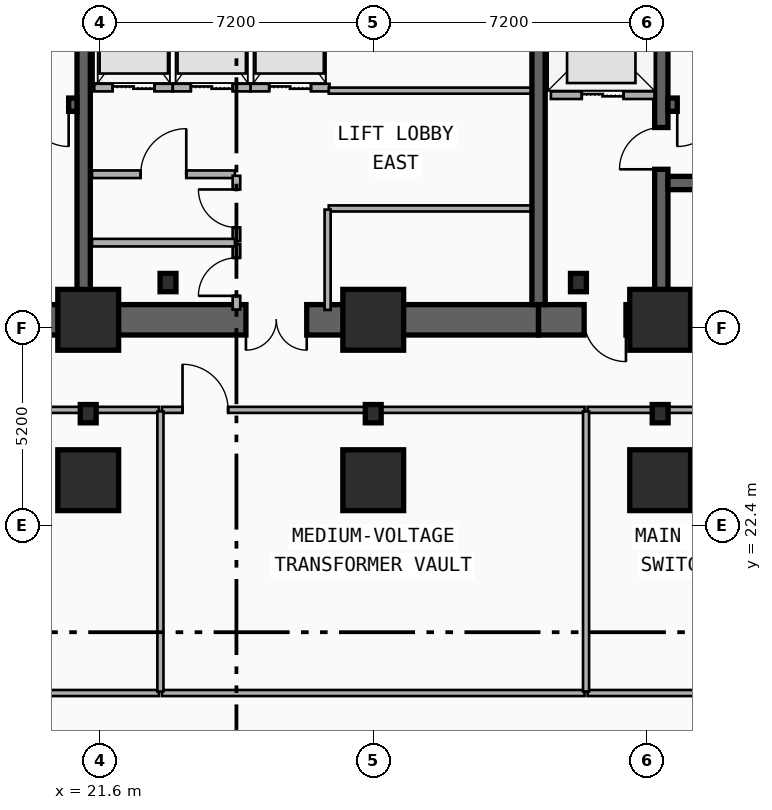
"""IFC4 building model, lengths in metres.
Left out: names, types, materials, properties, quantities, classifications, styles, units other than length and angle.
Written with IfcOpenShell. Run it as: python <this file> out.ifc"""

import sys

from ifc_helpers import new_model, si_unit, direction, frame, frame_2d, origin, origin_2d, place, context, subcontext, project, spatial, rectangle, i_section, extrude, element, fill, save


model = new_model("IFC4")
c1 = context("Model", 3, precision=1e-05, world=origin(), true_north=direction((0.0, 1.0)))
c2 = subcontext(c1, "Body", "Model", "MODEL_VIEW")
j1 = project(units=[si_unit("LENGTHUNIT", "METRE"), si_unit("PLANEANGLEUNIT", "RADIAN")], contexts=[c1])
p1 = place(None, origin())
s1 = spatial("IfcSite", under=j1, at=p1, CompositionType="ELEMENT")
p2 = place(p1, origin())
s2 = spatial("IfcBuilding", under=s1, at=p2, CompositionType="ELEMENT")
p3 = place(p2, frame((0.0, 0.0, -8.8)))
s3 = spatial("IfcBuildingStorey", under=s2, at=p3, CompositionType="ELEMENT", Elevation=-8.8)
p4 = place(p3, frame((21.18, 27.82, 0.0), z_axis=(0.0, 0.0, 1.0), x_axis=(-1.0, 0.0, 0.0)))
e1 = element("IfcWall", 1, at=p4, inside=s3, PredefinedType="SHEAR", context=c2, shape_type="SweptSolid", body=[
    extrude(rectangle(XDim=9.03, YDim=0.8, at=frame_2d((4.515, 0.0))), origin(), (0.0, 0.0, 1.0), 4.4),
])
p5 = place(p4, frame((2.68, 0.0, 0.0)))
e2 = element("IfcOpeningElement", 2, at=p5, cuts=e1, PredefinedType="OPENING", context=c2, shape_type="SweptSolid", body=[
    extrude(rectangle(XDim=1.1, YDim=2.15, at=frame_2d((0.55, 1.075))), frame((0.0, 0.41, 0.0), z_axis=(0.0, -1.0, 0.0), x_axis=(1.0, 0.0, 0.0)), (0.0, 0.0, 1.0), 0.82),
])
p6 = place(p3, frame((33.15, 27.82, 0.0), z_axis=(0.0, 0.0, 1.0), x_axis=(-1.0, 0.0, 0.0)))
e3 = element("IfcWall", 3, at=p6, inside=s3, PredefinedType="SHEAR", context=c2, shape_type="SweptSolid", body=[
    extrude(rectangle(XDim=11.97, YDim=0.8, at=frame_2d((5.985, 0.0))), origin(), (0.0, 0.0, 1.0), 4.4),
])
p7 = place(p6, frame((6.1, 0.0, 0.0)))
e4 = element("IfcOpeningElement", 4, at=p7, cuts=e3, PredefinedType="OPENING", context=c2, shape_type="SweptSolid", body=[
    extrude(rectangle(XDim=1.6, YDim=2.2, at=frame_2d((0.8, 1.1))), frame((0.0, 0.41, 0.0), z_axis=(0.0, -1.0, 0.0), x_axis=(1.0, 0.0, 0.0)), (0.0, 0.0, 1.0), 0.82),
])
p8 = place(p3, frame((45.38, 27.82, 0.0), z_axis=(0.0, 0.0, 1.0), x_axis=(-1.0, 0.0, 0.0)))
e5 = element("IfcWall", 5, at=p8, inside=s3, PredefinedType="SHEAR", context=c2, shape_type="SweptSolid", body=[
    extrude(rectangle(XDim=12.23, YDim=0.8, at=frame_2d((6.115, 0.0))), origin(), (0.0, 0.0, 1.0), 4.4),
])
p9 = place(p8, frame((9.93, 0.0, 0.0)))
e6 = element("IfcOpeningElement", 6, at=p9, cuts=e5, PredefinedType="OPENING", context=c2, shape_type="SweptSolid", body=[
    extrude(rectangle(XDim=1.1, YDim=2.15, at=frame_2d((0.55, 1.075))), frame((0.0, 0.41, 0.0), z_axis=(0.0, -1.0, 0.0), x_axis=(1.0, 0.0, 0.0)), (0.0, 0.0, 1.0), 0.82),
])
p10 = place(p8, frame((6.23, 0.0, 0.0)))
e7 = element("IfcOpeningElement", 7, at=p10, cuts=e5, PredefinedType="OPENING", context=c2, shape_type="SweptSolid", body=[
    extrude(rectangle(XDim=1.1, YDim=2.15, at=frame_2d((0.55, 1.075))), frame((0.0, 0.41, 0.0), z_axis=(0.0, -1.0, 0.0), x_axis=(1.0, 0.0, 0.0)), (0.0, 0.0, 1.0), 0.82),
])
for number, where, z_axis, x_axis in (
    (8, (21.18, 28.22, 0.0), (0.0, 0.0, 1.0), (0.0, 1.0, 0.0)),
    (9, (33.15, 28.22, 0.0), (0.0, 0.0, 1.0), (0.0, 1.0, 0.0)),
):
    element("IfcWall", number, at=place(p3, frame(where, z_axis=z_axis, x_axis=x_axis)), inside=s3, PredefinedType="SHEAR", context=c2, shape_type="SweptSolid", body=[
        extrude(rectangle(XDim=8.43, YDim=0.35, at=frame_2d((4.215, 0.0))), origin(), (0.0, 0.0, 1.0), 4.4),
    ])
p11 = place(p3, frame((36.38, 28.22, 0.0), z_axis=(0.0, 0.0, 1.0), x_axis=(0.0, 1.0, 0.0)))
e10 = element("IfcWall", 10, at=p11, inside=s3, PredefinedType="SHEAR", context=c2, shape_type="SweptSolid", body=[
    extrude(rectangle(XDim=8.43, YDim=0.35, at=frame_2d((4.215, 0.0))), origin(), (0.0, 0.0, 1.0), 4.4),
])
p12 = place(p11, frame((3.56, 0.0, 0.0)))
e11 = element("IfcOpeningElement", 11, at=p12, cuts=e10, PredefinedType="OPENING", context=c2, shape_type="SweptSolid", body=[
    extrude(rectangle(XDim=1.1, YDim=2.15, at=frame_2d((0.55, 1.075))), frame((0.0, 0.185, 0.0), z_axis=(0.0, -1.0, 0.0), x_axis=(1.0, 0.0, 0.0)), (0.0, 0.0, 1.0), 0.37),
])
p13 = place(p3, frame((21.005, 33.48, 0.0), z_axis=(0.0, 0.0, 1.0), x_axis=(-1.0, 0.0, 0.0)))
e12 = element("IfcWall", 12, at=p13, inside=s3, PredefinedType="SHEAR", context=c2, shape_type="SweptSolid", body=[
    extrude(rectangle(XDim=8.455, YDim=0.35, at=frame_2d((4.228, 0.0))), origin(), (0.0, 0.0, 1.0), 4.4),
])
p14 = place(p13, frame((0.22, 0.0, 0.0)))
e13 = element("IfcOpeningElement", 13, at=p14, cuts=e12, PredefinedType="OPENING", context=c2, shape_type="SweptSolid", body=[
    extrude(rectangle(XDim=1.1, YDim=2.15, at=frame_2d((0.55, 1.075))), frame((0.0, 0.185, 0.0), z_axis=(0.0, -1.0, 0.0), x_axis=(1.0, 0.0, 0.0)), (0.0, 0.0, 1.0), 0.37),
])
p15 = place(p3, frame((44.98, 33.48, 0.0), z_axis=(0.0, 0.0, 1.0), x_axis=(-1.0, 0.0, 0.0)))
e14 = element("IfcWall", 14, at=p15, inside=s3, PredefinedType="SHEAR", context=c2, shape_type="SweptSolid", body=[
    extrude(rectangle(XDim=8.425, YDim=0.35, at=frame_2d((4.212, 0.0))), origin(), (0.0, 0.0, 1.0), 4.4),
])
p16 = place(p15, frame((7.08, 0.0, 0.0)))
e15 = element("IfcOpeningElement", 15, at=p16, cuts=e14, PredefinedType="OPENING", context=c2, shape_type="SweptSolid", body=[
    extrude(rectangle(XDim=1.1, YDim=2.15, at=frame_2d((0.55, 1.075))), frame((0.0, 0.185, 0.0), z_axis=(0.0, -1.0, 0.0), x_axis=(1.0, 0.0, 0.0)), (0.0, 0.0, 1.0), 0.37),
])
p17 = place(p3, frame((36.555, 31.42, 0.0), z_axis=(0.0, 0.0, 1.0), x_axis=(1.0, 0.0, 0.0)))
e16 = element("IfcWall", 16, at=p17, inside=s3, PredefinedType="SHEAR", context=c2, shape_type="SweptSolid", body=[
    extrude(rectangle(XDim=8.425, YDim=0.35, at=frame_2d((4.212, 0.0))), origin(), (0.0, 0.0, 1.0), 4.4),
])
for number, where, z_axis, x_axis in (
    (17, (23.4, 28.8, 0.0), (0.0, 0.0, 1.0), (1.0, 0.0, 0.0)),
    (18, (34.2, 28.8, 0.0), (0.0, 0.0, 1.0), (1.0, 0.0, 0.0)),
):
    element("IfcColumn", number, at=place(p3, frame(where, z_axis=z_axis, x_axis=x_axis)), inside=s3, PredefinedType="COLUMN", context=c2, shape_type="SweptSolid", body=[
        extrude(i_section(OverallWidth=0.418, OverallDepth=0.481, WebThickness=0.043, FlangeThickness=0.068, FilletRadius=0.015, at=origin_2d()), origin(), (0.0, 0.0, 1.0), 4.4),
    ])
for number, where, z_axis, x_axis in (
    (19, (21.3, 27.82, 0.0), (0.0, 0.0, 1.0), (1.0, 0.0, 0.0)),
    (20, (28.8, 27.82, 0.0), (0.0, 0.0, 1.0), (1.0, 0.0, 0.0)),
    (21, (36.35, 27.82, 0.0), (0.0, 0.0, 1.0), (1.0, 0.0, 0.0)),
):
    element("IfcColumn", number, at=place(p3, frame(where, z_axis=z_axis, x_axis=x_axis)), inside=s3, PredefinedType="COLUMN", context=c2, shape_type="SweptSolid", body=[
        extrude(rectangle(XDim=1.6, YDim=1.6, at=origin_2d()), origin(), (0.0, 0.0, 1.0), 4.4),
    ])
for number, where, z_axis, x_axis in (
    (22, (21.3, 25.35, 0.0), (0.0, 0.0, 1.0), (1.0, 0.0, 0.0)),
    (23, (28.8, 25.35, 0.0), (0.0, 0.0, 1.0), (1.0, 0.0, 0.0)),
    (24, (36.35, 25.35, 0.0), (0.0, 0.0, 1.0), (1.0, 0.0, 0.0)),
):
    element("IfcColumn", number, at=place(p3, frame(where, z_axis=z_axis, x_axis=x_axis)), inside=s3, PredefinedType="COLUMN", context=c2, shape_type="SweptSolid", body=[
        extrude(i_section(OverallWidth=0.418, OverallDepth=0.481, WebThickness=0.043, FlangeThickness=0.068, FilletRadius=0.015, at=origin_2d()), origin(), (0.0, 0.0, 1.0), 4.4),
    ])
for number, where, z_axis, x_axis in (
    (25, (21.3, 23.6, 0.0), (0.0, 0.0, 1.0), (1.0, 0.0, 0.0)),
    (26, (28.8, 23.6, 0.0), (0.0, 0.0, 1.0), (1.0, 0.0, 0.0)),
    (27, (36.35, 23.6, 0.0), (0.0, 0.0, 1.0), (1.0, 0.0, 0.0)),
):
    element("IfcColumn", number, at=place(p3, frame(where, z_axis=z_axis, x_axis=x_axis)), inside=s3, PredefinedType="COLUMN", context=c2, shape_type="SweptSolid", body=[
        extrude(rectangle(XDim=1.6, YDim=1.6, at=origin_2d()), origin(), (0.0, 0.0, 1.0), 4.4),
    ])
p18 = place(p3, frame((33.475, 33.73, 0.0), z_axis=(0.0, 0.0, 1.0), x_axis=(1.0, 0.0, 0.0)))
e28 = element("IfcWall", 28, at=p18, inside=s3, PredefinedType="PARTITIONING", context=c2, shape_type="SweptSolid", body=[
    extrude(rectangle(XDim=2.725, YDim=0.2, at=frame_2d((1.362, 0.0))), origin(), (0.0, 0.0, 1.0), 3.052),
])
p19 = place(p18, frame((0.812, 0.0, 0.0)))
e29 = element("IfcOpeningElement", 29, at=p19, cuts=e28, PredefinedType="OPENING", context=c2, shape_type="SweptSolid", body=[
    extrude(rectangle(XDim=1.1, YDim=2.15, at=frame_2d((0.55, 1.075))), frame((0.0, 0.11, 0.0), z_axis=(0.0, -1.0, 0.0), x_axis=(1.0, 0.0, 0.0)), (0.0, 0.0, 1.0), 0.22),
])
p20 = place(p3, frame((21.46, 33.93, 0.0), z_axis=(0.0, 0.0, 1.0), x_axis=(1.0, 0.0, 0.0)))
e30 = element("IfcWall", 30, at=p20, inside=s3, PredefinedType="PARTITIONING", context=c2, shape_type="SweptSolid", body=[
    extrude(rectangle(XDim=2.065, YDim=0.2, at=frame_2d((1.032, 0.0))), origin(), (0.0, 0.0, 1.0), 3.052),
])
p21 = place(p20, frame((0.482, 0.0, 0.0)))
e31 = element("IfcOpeningElement", 31, at=p21, cuts=e30, PredefinedType="OPENING", context=c2, shape_type="SweptSolid", body=[
    extrude(rectangle(XDim=1.1, YDim=2.15, at=frame_2d((0.55, 1.075))), frame((0.0, 0.11, 0.0), z_axis=(0.0, -1.0, 0.0), x_axis=(1.0, 0.0, 0.0)), (0.0, 0.0, 1.0), 0.22),
])
p22 = place(p3, frame((23.525, 33.93, 0.0), z_axis=(0.0, 0.0, 1.0), x_axis=(1.0, 0.0, 0.0)))
e32 = element("IfcWall", 32, at=p22, inside=s3, PredefinedType="PARTITIONING", context=c2, shape_type="SweptSolid", body=[
    extrude(rectangle(XDim=2.05, YDim=0.2, at=frame_2d((1.025, 0.0))), origin(), (0.0, 0.0, 1.0), 4.08),
])
p23 = place(p22, frame((0.475, 0.0, 0.0)))
e33 = element("IfcOpeningElement", 33, at=p23, cuts=e32, PredefinedType="OPENING", context=c2, shape_type="SweptSolid", body=[
    extrude(rectangle(XDim=1.1, YDim=2.15, at=frame_2d((0.55, 1.075))), frame((0.0, 0.11, 0.0), z_axis=(0.0, -1.0, 0.0), x_axis=(1.0, 0.0, 0.0)), (0.0, 0.0, 1.0), 0.22),
])
p24 = place(p3, frame((25.575, 33.93, 0.0), z_axis=(0.0, 0.0, 1.0), x_axis=(1.0, 0.0, 0.0)))
e34 = element("IfcWall", 34, at=p24, inside=s3, PredefinedType="PARTITIONING", context=c2, shape_type="SweptSolid", body=[
    extrude(rectangle(XDim=2.075, YDim=0.2, at=frame_2d((1.038, 0.0))), origin(), (0.0, 0.0, 1.0), 4.08),
])
p25 = place(p24, frame((0.488, 0.0, 0.0)))
e35 = element("IfcOpeningElement", 35, at=p25, cuts=e34, PredefinedType="OPENING", context=c2, shape_type="SweptSolid", body=[
    extrude(rectangle(XDim=1.1, YDim=2.15, at=frame_2d((0.55, 1.075))), frame((0.0, 0.11, 0.0), z_axis=(0.0, -1.0, 0.0), x_axis=(1.0, 0.0, 0.0)), (0.0, 0.0, 1.0), 0.22),
])
p26 = place(p3, frame((21.4, 31.65, 0.0), z_axis=(0.0, 0.0, 1.0), x_axis=(1.0, 0.0, 0.0)))
e36 = element("IfcWall", 36, at=p26, inside=s3, PredefinedType="PARTITIONING", context=c2, shape_type="SweptSolid", body=[
    extrude(rectangle(XDim=3.76, YDim=0.2, at=frame_2d((1.88, 0.0))), origin(), (0.0, 0.0, 1.0), 3.052),
])
p27 = place(p26, frame((1.28, 0.0, 0.0)))
e37 = element("IfcOpeningElement", 37, at=p27, cuts=e36, PredefinedType="OPENING", context=c2, shape_type="SweptSolid", body=[
    extrude(rectangle(XDim=1.2, YDim=2.15, at=frame_2d((0.6, 1.075))), frame((0.0, 0.11, 0.0), z_axis=(0.0, -1.0, 0.0), x_axis=(1.0, 0.0, 0.0)), (0.0, 0.0, 1.0), 0.22),
])
p28 = place(p3, frame((25.2, 28.09, 0.0), z_axis=(0.0, 0.0, 1.0), x_axis=(0.0, 1.0, 0.0)))
e38 = element("IfcWall", 38, at=p28, inside=s3, PredefinedType="PARTITIONING", context=c2, shape_type="SweptSolid", body=[
    extrude(rectangle(XDim=1.72, YDim=0.2, at=frame_2d((0.86, 0.0))), origin(), (0.0, 0.0, 1.0), 4.08),
])
p29 = place(p28, frame((0.36, 0.0, 0.0)))
e39 = element("IfcOpeningElement", 39, at=p29, cuts=e38, PredefinedType="OPENING", context=c2, shape_type="SweptSolid", body=[
    extrude(rectangle(XDim=1.0, YDim=2.15, at=frame_2d((0.5, 1.075))), frame((0.0, 0.11, 0.0), z_axis=(0.0, -1.0, 0.0), x_axis=(1.0, 0.0, 0.0)), (0.0, 0.0, 1.0), 0.22),
])
p30 = place(p3, frame((25.2, 29.89, 0.0), z_axis=(0.0, 0.0, 1.0), x_axis=(0.0, 1.0, 0.0)))
e40 = element("IfcWall", 40, at=p30, inside=s3, PredefinedType="PARTITIONING", context=c2, shape_type="SweptSolid", body=[
    extrude(rectangle(XDim=1.72, YDim=0.2, at=frame_2d((0.86, 0.0))), origin(), (0.0, 0.0, 1.0), 4.08),
])
p31 = place(p30, frame((0.36, 0.0, 0.0)))
e41 = element("IfcOpeningElement", 41, at=p31, cuts=e40, PredefinedType="OPENING", context=c2, shape_type="SweptSolid", body=[
    extrude(rectangle(XDim=1.0, YDim=2.15, at=frame_2d((0.5, 1.075))), frame((0.0, 0.11, 0.0), z_axis=(0.0, -1.0, 0.0), x_axis=(1.0, 0.0, 0.0)), (0.0, 0.0, 1.0), 0.22),
])
p32 = place(p3, frame((21.4, 29.85, 0.0), z_axis=(0.0, 0.0, 1.0), x_axis=(1.0, 0.0, 0.0)))
e42 = element("IfcWall", 42, at=p32, inside=s3, PredefinedType="PARTITIONING", context=c2, shape_type="SweptSolid", body=[
    extrude(rectangle(XDim=3.76, YDim=0.2, at=frame_2d((1.88, 0.0))), origin(), (0.0, 0.0, 1.0), 3.052),
])
p33 = place(p3, frame((12.04, 25.45, 0.0), z_axis=(0.0, 0.0, 1.0), x_axis=(1.0, 0.0, 0.0)))
e43 = element("IfcWall", 43, at=p33, inside=s3, PredefinedType="PARTITIONING", context=c2, shape_type="SweptSolid", body=[
    extrude(rectangle(XDim=11.12, YDim=0.16, at=frame_2d((5.56, 0.0))), origin(), (0.0, 0.0, 1.0), 3.246),
])
p34 = place(p33, frame((4.96, 0.0, 0.0)))
e44 = element("IfcOpeningElement", 44, at=p34, cuts=e43, PredefinedType="OPENING", context=c2, shape_type="SweptSolid", body=[
    extrude(rectangle(XDim=1.2, YDim=2.15, at=frame_2d((0.6, 1.075))), frame((0.0, 0.09, 0.0), z_axis=(0.0, -1.0, 0.0), x_axis=(1.0, 0.0, 0.0)), (0.0, 0.0, 1.0), 0.18),
])
p35 = place(p3, frame((23.24, 25.45, 0.0), z_axis=(0.0, 0.0, 1.0), x_axis=(1.0, 0.0, 0.0)))
e45 = element("IfcWall", 45, at=p35, inside=s3, PredefinedType="PARTITIONING", context=c2, shape_type="SweptSolid", body=[
    extrude(rectangle(XDim=11.12, YDim=0.16, at=frame_2d((5.56, 0.0))), origin(), (0.0, 0.0, 1.0), 4.08),
])
p36 = place(p35, frame((0.542, 0.0, 0.0)))
e46 = element("IfcOpeningElement", 46, at=p36, cuts=e45, PredefinedType="OPENING", context=c2, shape_type="SweptSolid", body=[
    extrude(rectangle(XDim=1.2, YDim=2.15, at=frame_2d((0.6, 1.075))), frame((0.0, 0.09, 0.0), z_axis=(0.0, -1.0, 0.0), x_axis=(1.0, 0.0, 0.0)), (0.0, 0.0, 1.0), 0.18),
])
p37 = place(p3, frame((34.44, 25.45, 0.0), z_axis=(0.0, 0.0, 1.0), x_axis=(1.0, 0.0, 0.0)))
e47 = element("IfcWall", 47, at=p37, inside=s3, PredefinedType="PARTITIONING", context=c2, shape_type="SweptSolid", body=[
    extrude(rectangle(XDim=11.12, YDim=0.16, at=frame_2d((5.56, 0.0))), origin(), (0.0, 0.0, 1.0), 3.246),
])
p38 = place(p37, frame((4.96, 0.0, 0.0)))
e48 = element("IfcOpeningElement", 48, at=p38, cuts=e47, PredefinedType="OPENING", context=c2, shape_type="SweptSolid", body=[
    extrude(rectangle(XDim=1.2, YDim=2.15, at=frame_2d((0.6, 1.075))), frame((0.0, 0.09, 0.0), z_axis=(0.0, -1.0, 0.0), x_axis=(1.0, 0.0, 0.0)), (0.0, 0.0, 1.0), 0.18),
])
p39 = place(p3, frame((12.04, 18.0, 0.0), z_axis=(0.0, 0.0, 1.0), x_axis=(1.0, 0.0, 0.0)))
e49 = element("IfcWall", 49, at=p39, inside=s3, PredefinedType="PARTITIONING", context=c2, shape_type="SweptSolid", body=[
    extrude(rectangle(XDim=11.12, YDim=0.16, at=frame_2d((5.56, 0.0))), origin(), (0.0, 0.0, 1.0), 3.246),
])
p40 = place(p3, frame((23.24, 18.0, 0.0), z_axis=(0.0, 0.0, 1.0), x_axis=(1.0, 0.0, 0.0)))
e50 = element("IfcWall", 50, at=p40, inside=s3, PredefinedType="PARTITIONING", context=c2, shape_type="SweptSolid", body=[
    extrude(rectangle(XDim=11.12, YDim=0.16, at=frame_2d((5.56, 0.0))), origin(), (0.0, 0.0, 1.0), 4.08),
])
p41 = place(p3, frame((34.44, 18.0, 0.0), z_axis=(0.0, 0.0, 1.0), x_axis=(1.0, 0.0, 0.0)))
e51 = element("IfcWall", 51, at=p41, inside=s3, PredefinedType="PARTITIONING", context=c2, shape_type="SweptSolid", body=[
    extrude(rectangle(XDim=11.12, YDim=0.16, at=frame_2d((5.56, 0.0))), origin(), (0.0, 0.0, 1.0), 3.246),
])
for number, where, z_axis, x_axis in (
    (52, (23.2, 18.04, 0.0), (0.0, 0.0, 1.0), (0.0, 1.0, 0.0)),
    (53, (34.4, 18.04, 0.0), (0.0, 0.0, 1.0), (0.0, 1.0, 0.0)),
):
    element("IfcWall", number, at=place(p3, frame(where, z_axis=z_axis, x_axis=x_axis)), inside=s3, PredefinedType="PARTITIONING", context=c2, shape_type="SweptSolid", body=[
        extrude(rectangle(XDim=7.37, YDim=0.16, at=frame_2d((3.685, 0.0))), origin(), (0.0, 0.0, 1.0), 2.66),
    ])
for number, where, z_axis, x_axis in (
    (54, (27.63, 30.75, 0.0), (0.0, 0.0, 1.0), (1.0, 0.0, 0.0)),
    (55, (27.63, 33.85, 0.0), (0.0, 0.0, 1.0), (1.0, 0.0, 0.0)),
):
    element("IfcWall", number, at=place(p3, frame(where, z_axis=z_axis, x_axis=x_axis)), inside=s3, PredefinedType="PARTITIONING", context=c2, shape_type="SweptSolid", body=[
        extrude(rectangle(XDim=5.31, YDim=0.16, at=frame_2d((2.655, 0.0))), origin(), (0.0, 0.0, 1.0), 3.052),
    ])
p42 = place(p3, frame((27.6, 28.08, 0.0), z_axis=(0.0, 0.0, 1.0), x_axis=(0.0, 1.0, 0.0)))
e56 = element("IfcWall", 56, at=p42, inside=s3, PredefinedType="PARTITIONING", context=c2, shape_type="SweptSolid", body=[
    extrude(rectangle(XDim=2.64, YDim=0.16, at=frame_2d((1.32, 0.0))), origin(), (0.0, 0.0, 1.0), 4.08),
])
p43 = place(p19, origin())
e57 = element("IfcDoor", 57, at=p43, inside=s3, OperationType="DOUBLE_DOOR_SLIDING", PredefinedType="DOOR", context=c2, shape_type="SweptSolid", body=[
    extrude(rectangle(XDim=1.1, YDim=2.15, at=frame_2d((0.55, 1.075))), frame((0.0, 0.025, 0.0), z_axis=(0.0, -1.0, 0.0), x_axis=(1.0, 0.0, 0.0)), (0.0, 0.0, 1.0), 0.05),
])
fill(e29, e57)
p44 = place(p21, origin())
e58 = element("IfcDoor", 58, at=p44, inside=s3, OperationType="DOUBLE_DOOR_SLIDING", PredefinedType="DOOR", context=c2, shape_type="SweptSolid", body=[
    extrude(rectangle(XDim=1.1, YDim=2.15, at=frame_2d((0.55, 1.075))), frame((0.0, 0.025, 0.0), z_axis=(0.0, -1.0, 0.0), x_axis=(1.0, 0.0, 0.0)), (0.0, 0.0, 1.0), 0.05),
])
fill(e31, e58)
p45 = place(p23, origin())
e59 = element("IfcDoor", 59, at=p45, inside=s3, OperationType="DOUBLE_DOOR_SLIDING", PredefinedType="DOOR", context=c2, shape_type="SweptSolid", body=[
    extrude(rectangle(XDim=1.1, YDim=2.15, at=frame_2d((0.55, 1.075))), frame((0.0, 0.025, 0.0), z_axis=(0.0, -1.0, 0.0), x_axis=(1.0, 0.0, 0.0)), (0.0, 0.0, 1.0), 0.05),
])
fill(e33, e59)
p46 = place(p25, origin())
e60 = element("IfcDoor", 60, at=p46, inside=s3, OperationType="DOUBLE_DOOR_SLIDING", PredefinedType="DOOR", context=c2, shape_type="SweptSolid", body=[
    extrude(rectangle(XDim=1.1, YDim=2.15, at=frame_2d((0.55, 1.075))), frame((0.0, 0.025, 0.0), z_axis=(0.0, -1.0, 0.0), x_axis=(1.0, 0.0, 0.0)), (0.0, 0.0, 1.0), 0.05),
])
fill(e35, e60)
p47 = place(p14, origin())
e61 = element("IfcDoor", 61, at=p47, inside=s3, OperationType="SINGLE_SWING_LEFT", PredefinedType="DOOR", context=c2, shape_type="SweptSolid", body=[
    extrude(rectangle(XDim=1.1, YDim=2.15, at=frame_2d((0.55, 1.075))), frame((0.0, 0.025, 0.0), z_axis=(0.0, -1.0, 0.0), x_axis=(1.0, 0.0, 0.0)), (0.0, 0.0, 1.0), 0.05),
])
fill(e13, e61)
p48 = place(p16, origin())
e62 = element("IfcDoor", 62, at=p48, inside=s3, OperationType="SINGLE_SWING_RIGHT", PredefinedType="DOOR", context=c2, shape_type="SweptSolid", body=[
    extrude(rectangle(XDim=1.1, YDim=2.15, at=frame_2d((0.55, 1.075))), frame((0.0, 0.025, 0.0), z_axis=(0.0, -1.0, 0.0), x_axis=(1.0, 0.0, 0.0)), (0.0, 0.0, 1.0), 0.05),
])
fill(e15, e62)
p49 = place(p12, origin())
e63 = element("IfcDoor", 63, at=p49, inside=s3, OperationType="SINGLE_SWING_LEFT", PredefinedType="DOOR", context=c2, shape_type="SweptSolid", body=[
    extrude(rectangle(XDim=1.1, YDim=2.15, at=frame_2d((0.55, 1.075))), frame((0.0, 0.025, 0.0), z_axis=(0.0, -1.0, 0.0), x_axis=(1.0, 0.0, 0.0)), (0.0, 0.0, 1.0), 0.05),
])
fill(e11, e63)
p50 = place(p9, origin())
e64 = element("IfcDoor", 64, at=p50, inside=s3, OperationType="SINGLE_SWING_LEFT", PredefinedType="DOOR", context=c2, shape_type="SweptSolid", body=[
    extrude(rectangle(XDim=1.1, YDim=2.15, at=frame_2d((0.55, 1.075))), frame((0.0, 0.025, 0.0), z_axis=(0.0, -1.0, 0.0), x_axis=(1.0, 0.0, 0.0)), (0.0, 0.0, 1.0), 0.05),
])
fill(e6, e64)
p51 = place(p7, origin())
e65 = element("IfcDoor", 65, at=p51, inside=s3, OperationType="SINGLE_SWING_LEFT", PredefinedType="DOOR", context=c2, shape_type="SweptSolid", body=[
    extrude(rectangle(XDim=1.6, YDim=2.2, at=frame_2d((0.8, 1.1))), frame((0.0, 0.025, 0.0), z_axis=(0.0, -1.0, 0.0), x_axis=(1.0, 0.0, 0.0)), (0.0, 0.0, 1.0), 0.05),
])
fill(e4, e65)
p52 = place(p27, origin())
e66 = element("IfcDoor", 66, at=p52, inside=s3, OperationType="SINGLE_SWING_RIGHT", PredefinedType="DOOR", context=c2, shape_type="SweptSolid", body=[
    extrude(rectangle(XDim=1.2, YDim=2.15, at=frame_2d((0.6, 1.075))), frame((0.0, 0.025, 0.0), z_axis=(0.0, -1.0, 0.0), x_axis=(1.0, 0.0, 0.0)), (0.0, 0.0, 1.0), 0.05),
])
fill(e37, e66)
p53 = place(p29, origin())
e67 = element("IfcDoor", 67, at=p53, inside=s3, OperationType="SINGLE_SWING_LEFT", PredefinedType="DOOR", context=c2, shape_type="SweptSolid", body=[
    extrude(rectangle(XDim=1.0, YDim=2.15, at=frame_2d((0.5, 1.075))), frame((0.0, 0.025, 0.0), z_axis=(0.0, -1.0, 0.0), x_axis=(1.0, 0.0, 0.0)), (0.0, 0.0, 1.0), 0.05),
])
fill(e39, e67)
p54 = place(p31, origin())
e68 = element("IfcDoor", 68, at=p54, inside=s3, OperationType="SINGLE_SWING_RIGHT", PredefinedType="DOOR", context=c2, shape_type="SweptSolid", body=[
    extrude(rectangle(XDim=1.0, YDim=2.15, at=frame_2d((0.5, 1.075))), frame((0.0, 0.025, 0.0), z_axis=(0.0, -1.0, 0.0), x_axis=(1.0, 0.0, 0.0)), (0.0, 0.0, 1.0), 0.05),
])
fill(e41, e68)
p55 = place(p36, origin())
e69 = element("IfcDoor", 69, at=p55, inside=s3, OperationType="SINGLE_SWING_LEFT", PredefinedType="DOOR", context=c2, shape_type="SweptSolid", body=[
    extrude(rectangle(XDim=1.2, YDim=2.15, at=frame_2d((0.6, 1.075))), frame((0.0, 0.025, 0.0), z_axis=(0.0, -1.0, 0.0), x_axis=(1.0, 0.0, 0.0)), (0.0, 0.0, 1.0), 0.05),
])
fill(e46, e69)
save(model, sys.argv[1])
